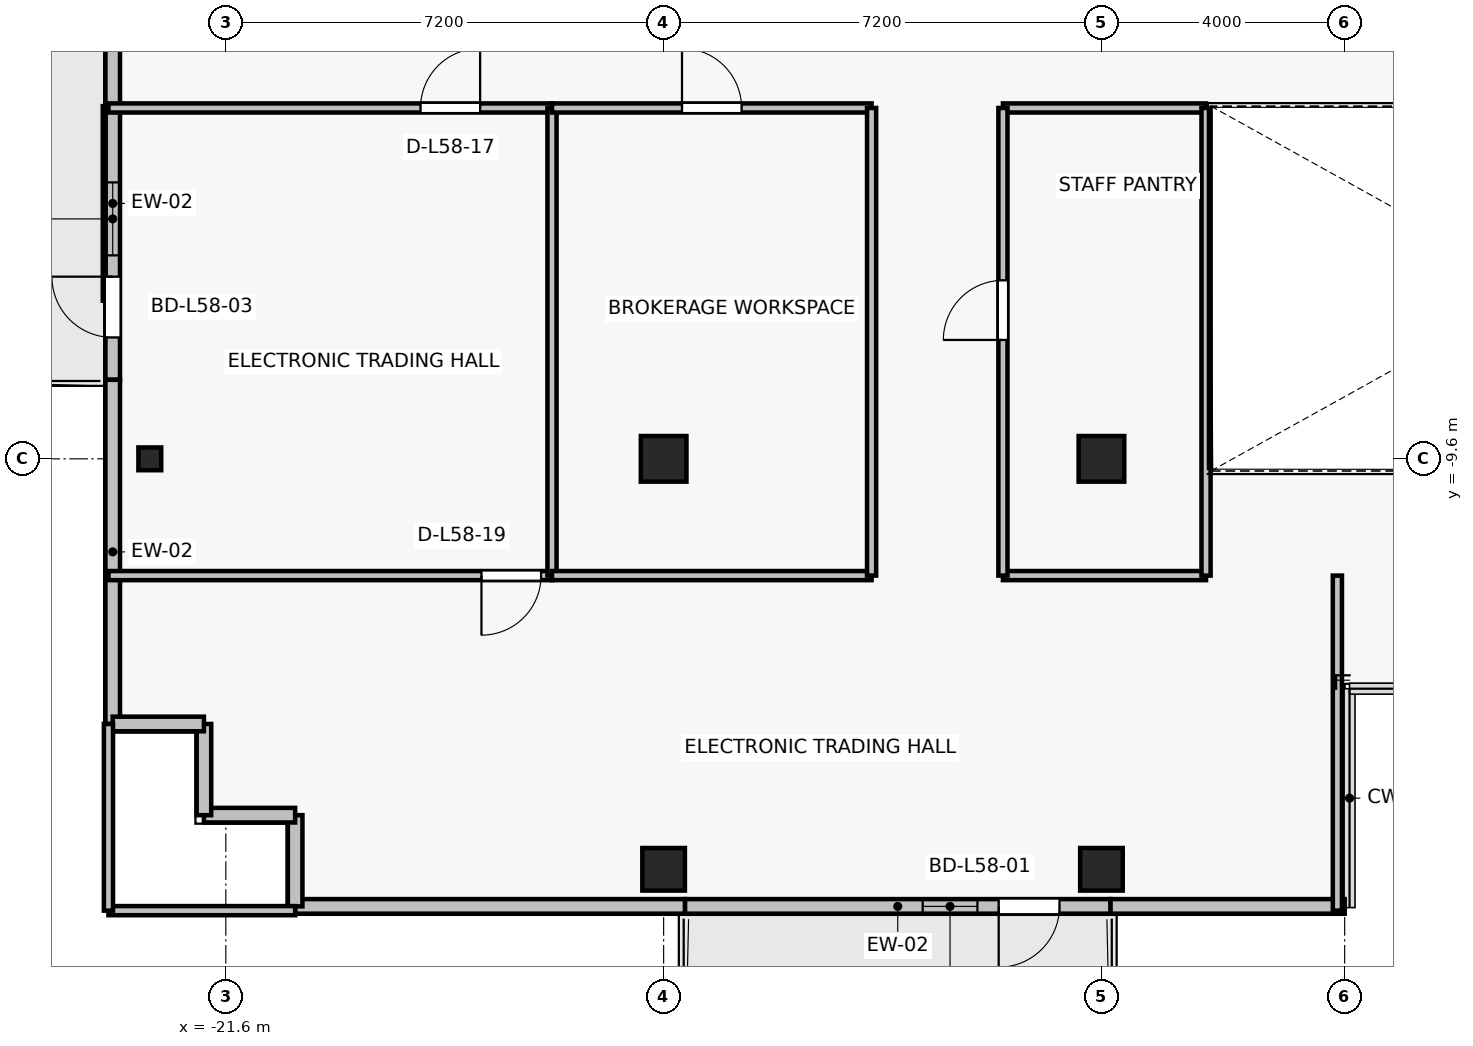
"""IFC4 building model, lengths in metres.
Left out: names, types, materials, properties, quantities, classifications, styles, units other than length and angle.
Written with IfcOpenShell. Run it as: python <this file> out.ifc"""

import sys

from ifc_helpers import new_model, si_unit, direction, frame, frame_2d, origin, origin_2d, place, context, subcontext, project, spatial, rectangle, i_section, extrude, source, transform, mapped, element, fill, save


model = new_model("IFC4")
c1 = context("Model", 3, precision=1e-05, world=origin(), true_north=direction((0.0, 1.0)))
c2 = subcontext(c1, "Body", "Model", "MODEL_VIEW")
j1 = project(units=[si_unit("LENGTHUNIT", "METRE"), si_unit("PLANEANGLEUNIT", "RADIAN")], contexts=[c1])
p1 = place(None, origin())
s1 = spatial("IfcSite", under=j1, at=p1, CompositionType="ELEMENT")
p2 = place(p1, origin())
s2 = spatial("IfcBuilding", under=s1, at=p2, CompositionType="ELEMENT")
p3 = place(p2, frame((0.0, 0.0, 208.9)))
s3 = spatial("IfcBuildingStorey", under=s2, at=p3, CompositionType="ELEMENT", Elevation=208.9)
for number, where, z_axis, x_axis in (
    (1, (-14.4, -9.6, 0.0), (0.0, 0.0, 1.0), (1.0, 0.0, 0.0)),
    (2, (-7.2, -9.6, 0.0), (0.0, 0.0, 1.0), (1.0, 0.0, 0.0)),
):
    element("IfcColumn", number, at=place(p3, frame(where, z_axis=z_axis, x_axis=x_axis)), inside=s3, PredefinedType="COLUMN", context=c2, shape_type="SweptSolid", body=[
        extrude(rectangle(XDim=0.75, YDim=0.75, at=origin_2d()), origin(), (0.0, 0.0, 1.0), 3.3),
    ])
for number, where, z_axis, x_axis in (
    (3, (-14.4, -16.35, 0.0), (0.0, 0.0, 1.0), (1.0, 0.0, 0.0)),
    (4, (-7.2, -16.35, 0.0), (0.0, 0.0, 1.0), (1.0, 0.0, 0.0)),
):
    element("IfcColumn", number, at=place(p3, frame(where, z_axis=z_axis, x_axis=x_axis)), inside=s3, PredefinedType="COLUMN", context=c2, shape_type="SweptSolid", body=[
        extrude(rectangle(XDim=0.7, YDim=0.7, at=origin_2d()), origin(), (0.0, 0.0, 1.0), 3.3),
    ])
p4 = place(p3, frame((-22.85, -9.6, 0.0), z_axis=(0.0, 0.0, 1.0), x_axis=(1.0, 0.0, 0.0)))
e5 = element("IfcColumn", 5, at=p4, inside=s3, PredefinedType="COLUMN", context=c2, shape_type="SweptSolid", body=[
    extrude(i_section(OverallWidth=0.375, OverallDepth=0.375, WebThickness=0.017, FlangeThickness=0.027, FilletRadius=0.015, at=origin_2d()), origin(), (0.0, 0.0, 1.0), 3.3),
])
p5 = place(p3, frame((-7.05, -16.96, 0.0), z_axis=(0.0, 0.0, 1.0), x_axis=(-1.0, 0.0, 0.0)))
e6 = element("IfcWall", 6, at=p5, inside=s3, PredefinedType="SOLIDWALL", context=c2, shape_type="SweptSolid", body=[
    extrude(rectangle(XDim=7.0, YDim=0.24, at=frame_2d((3.5, 0.0))), origin(), (0.0, 0.0, 1.0), 2.665),
])
p6 = place(p5, frame((0.84, 0.0, 0.0)))
e7 = element("IfcOpeningElement", 7, at=p6, cuts=e6, PredefinedType="OPENING", context=c2, shape_type="SweptSolid", body=[
    extrude(rectangle(XDim=1.0, YDim=2.2, at=frame_2d((0.5, 1.1))), frame((0.0, 0.13, 0.0), z_axis=(0.0, -1.0, 0.0), x_axis=(1.0, 0.0, 0.0)), (0.0, 0.0, 1.0), 0.26),
])
p7 = place(p5, frame((2.19, 0.0, 0.85)))
e8 = element("IfcOpeningElement", 8, at=p7, cuts=e6, PredefinedType="OPENING", context=c2, shape_type="SweptSolid", body=[
    extrude(rectangle(XDim=0.9, YDim=1.35, at=frame_2d((0.45, 0.675))), frame((0.0, 0.13, 0.0), z_axis=(0.0, -1.0, 0.0), x_axis=(1.0, 0.0, 0.0)), (0.0, 0.0, 1.0), 0.26),
])
p8 = place(p3, frame((-23.46, -8.3, 0.0), z_axis=(0.0, 0.0, 1.0), x_axis=(0.0, 1.0, 0.0)))
e9 = element("IfcWall", 9, at=p8, inside=s3, PredefinedType="SOLIDWALL", context=c2, shape_type="SweptSolid", body=[
    extrude(rectangle(XDim=5.8, YDim=0.24, at=frame_2d((2.9, 0.0))), origin(), (0.0, 0.0, 1.0), 3.075),
])
p9 = place(p8, frame((0.696, 0.0, 0.0)))
e10 = element("IfcOpeningElement", 10, at=p9, cuts=e9, PredefinedType="OPENING", context=c2, shape_type="SweptSolid", body=[
    extrude(rectangle(XDim=1.0, YDim=2.2, at=frame_2d((0.5, 1.1))), frame((0.0, 0.13, 0.0), z_axis=(0.0, -1.0, 0.0), x_axis=(1.0, 0.0, 0.0)), (0.0, 0.0, 1.0), 0.26),
])
p10 = place(p8, frame((2.046, 0.0, 0.85)))
e11 = element("IfcOpeningElement", 11, at=p10, cuts=e9, PredefinedType="OPENING", context=c2, shape_type="SweptSolid", body=[
    extrude(rectangle(XDim=1.2, YDim=1.5, at=frame_2d((0.6, 0.75))), frame((0.0, 0.13, 0.0), z_axis=(0.0, -1.0, 0.0), x_axis=(1.0, 0.0, 0.0)), (0.0, 0.0, 1.0), 0.26),
])
p11 = place(p3, frame((-23.46, -8.3, 0.0), z_axis=(0.0, 0.0, 1.0), x_axis=(0.0, -1.0, 0.0)))
e12 = element("IfcWall", 12, at=p11, inside=s3, PredefinedType="SOLIDWALL", context=c2, shape_type="SweptSolid", body=[
    extrude(rectangle(XDim=5.66, YDim=0.24, at=frame_2d((2.83, 0.0))), origin(), (0.0, 0.0, 1.0), 3.075),
])
p12 = place(p3, frame((-7.05, -16.96, 0.0), z_axis=(0.0, 0.0, 1.0), x_axis=(1.0, 0.0, 0.0)))
e13 = element("IfcWall", 13, at=p12, inside=s3, PredefinedType="SOLIDWALL", context=c2, shape_type="SweptSolid", body=[
    extrude(rectangle(XDim=3.85, YDim=0.24, at=frame_2d((1.925, 0.0))), origin(), (0.0, 0.0, 1.0), 3.075),
])
p13 = place(p3, frame((-20.46, -16.96, 0.0), z_axis=(0.0, 0.0, 1.0), x_axis=(1.0, 0.0, 0.0)))
e14 = element("IfcWall", 14, at=p13, inside=s3, PredefinedType="SOLIDWALL", context=c2, shape_type="SweptSolid", body=[
    extrude(rectangle(XDim=6.41, YDim=0.24, at=frame_2d((3.205, 0.0))), origin(), (0.0, 0.0, 1.0), 3.075),
])
for number, where, z_axis, x_axis in (
    (15, (-20.46, -15.46, 0.0), (0.0, 0.0, 1.0), (0.0, -1.0, 0.0)),
    (16, (-21.96, -15.46, 0.0), (0.0, 0.0, 1.0), (1.0, 0.0, 0.0)),
    (17, (-21.96, -13.96, 0.0), (0.0, 0.0, 1.0), (0.0, -1.0, 0.0)),
    (18, (-23.46, -13.96, 0.0), (0.0, 0.0, 1.0), (1.0, 0.0, 0.0)),
):
    element("IfcWall", number, at=place(p3, frame(where, z_axis=z_axis, x_axis=x_axis)), inside=s3, PredefinedType="SOLIDWALL", context=c2, shape_type="SweptSolid", body=[
        extrude(rectangle(XDim=1.5, YDim=0.24, at=frame_2d((0.75, 0.0))), origin(), (0.0, 0.0, 1.0), 3.075),
    ])
p14 = place(p3, frame((-16.236, -11.52, 0.0), z_axis=(0.0, 0.0, 1.0), x_axis=(-1.0, 0.0, 0.0)))
e19 = element("IfcWall", 19, at=p14, inside=s3, PredefinedType="PARTITIONING", context=c2, shape_type="SweptSolid", body=[
    extrude(rectangle(XDim=7.294, YDim=0.15, at=frame_2d((3.647, 0.0))), origin(), (0.0, 0.0, 1.0), 3.075),
])
p15 = place(p14, frame((0.18, 0.0, 0.0)))
e20 = element("IfcOpeningElement", 20, at=p15, cuts=e19, PredefinedType="OPENING", context=c2, shape_type="SweptSolid", body=[
    extrude(rectangle(XDim=0.98, YDim=2.15, at=frame_2d((0.49, 1.075))), frame((0.0, 0.085, 0.0), z_axis=(0.0, -1.0, 0.0), x_axis=(1.0, 0.0, 0.0)), (0.0, 0.0, 1.0), 0.17),
])
p16 = place(p3, frame((-23.53, -3.83, 0.0), z_axis=(0.0, 0.0, 1.0), x_axis=(1.0, 0.0, 0.0)))
e21 = element("IfcWall", 21, at=p16, inside=s3, PredefinedType="PARTITIONING", context=c2, shape_type="SweptSolid", body=[
    extrude(rectangle(XDim=7.294, YDim=0.15, at=frame_2d((3.647, 0.0))), origin(), (0.0, 0.0, 1.0), 2.765),
])
p17 = place(p16, frame((5.132, 0.0, 0.0)))
e22 = element("IfcOpeningElement", 22, at=p17, cuts=e21, PredefinedType="OPENING", context=c2, shape_type="SweptSolid", body=[
    extrude(rectangle(XDim=0.98, YDim=2.15, at=frame_2d((0.49, 1.075))), frame((0.0, 0.085, 0.0), z_axis=(0.0, -1.0, 0.0), x_axis=(1.0, 0.0, 0.0)), (0.0, 0.0, 1.0), 0.17),
])
p18 = place(p3, frame((-16.236, -3.83, 0.0), z_axis=(0.0, 0.0, 1.0), x_axis=(0.0, -1.0, 0.0)))
e23 = element("IfcWall", 23, at=p18, inside=s3, PredefinedType="PARTITIONING", context=c2, shape_type="SweptSolid", body=[
    extrude(rectangle(XDim=7.69, YDim=0.15, at=frame_2d((3.845, 0.0))), origin(), (0.0, 0.0, 1.0), 2.615),
])
p19 = place(p3, frame((-10.98, -11.52, 0.0), z_axis=(0.0, 0.0, 1.0), x_axis=(-1.0, 0.0, 0.0)))
e24 = element("IfcWall", 24, at=p19, inside=s3, PredefinedType="PARTITIONING", context=c2, shape_type="SweptSolid", body=[
    extrude(rectangle(XDim=5.256, YDim=0.15, at=frame_2d((2.628, 0.0))), origin(), (0.0, 0.0, 1.0), 2.615),
])
p20 = place(p3, frame((-16.236, -3.83, 0.0), z_axis=(0.0, 0.0, 1.0), x_axis=(1.0, 0.0, 0.0)))
e25 = element("IfcWall", 25, at=p20, inside=s3, PredefinedType="PARTITIONING", context=c2, shape_type="SweptSolid", body=[
    extrude(rectangle(XDim=5.256, YDim=0.15, at=frame_2d((2.628, 0.0))), origin(), (0.0, 0.0, 1.0), 2.615),
])
p21 = place(p20, frame((2.138, 0.0, 0.0)))
e26 = element("IfcOpeningElement", 26, at=p21, cuts=e25, PredefinedType="OPENING", context=c2, shape_type="SweptSolid", body=[
    extrude(rectangle(XDim=0.98, YDim=2.15, at=frame_2d((0.49, 1.075))), frame((0.0, 0.085, 0.0), z_axis=(0.0, -1.0, 0.0), x_axis=(1.0, 0.0, 0.0)), (0.0, 0.0, 1.0), 0.17),
])
p22 = place(p3, frame((-10.98, -3.83, 0.0), z_axis=(0.0, 0.0, 1.0), x_axis=(0.0, -1.0, 0.0)))
e27 = element("IfcWall", 27, at=p22, inside=s3, PredefinedType="PARTITIONING", context=c2, shape_type="SweptSolid", body=[
    extrude(rectangle(XDim=7.69, YDim=0.15, at=frame_2d((3.845, 0.0))), origin(), (0.0, 0.0, 1.0), 2.615),
])
p23 = place(p3, frame((-20.46, -17.03, 0.0), z_axis=(0.0, 0.0, 1.0), x_axis=(-1.0, 0.0, 0.0)))
e28 = element("IfcWall", 28, at=p23, inside=s3, PredefinedType="PARTITIONING", context=c2, shape_type="SweptSolid", body=[
    extrude(rectangle(XDim=3.07, YDim=0.15, at=frame_2d((1.535, 0.0))), origin(), (0.0, 0.0, 1.0), 2.665),
])
p24 = place(p3, frame((-23.53, -17.03, 0.0), z_axis=(0.0, 0.0, 1.0), x_axis=(0.0, 1.0, 0.0)))
e29 = element("IfcWall", 29, at=p24, inside=s3, PredefinedType="PARTITIONING", context=c2, shape_type="SweptSolid", body=[
    extrude(rectangle(XDim=3.07, YDim=0.15, at=frame_2d((1.535, 0.0))), origin(), (0.0, 0.0, 1.0), 3.075),
])
p25 = place(p3, frame((-3.32, -11.52, 0.0), z_axis=(0.0, 0.0, 1.0), x_axis=(0.0, -1.0, 0.0)))
e30 = element("IfcWall", 30, at=p25, inside=s3, PredefinedType="PARTITIONING", context=c2, shape_type="SweptSolid", body=[
    extrude(rectangle(XDim=5.51, YDim=0.15, at=frame_2d((2.755, 0.0))), origin(), (0.0, 0.0, 1.0), 2.615),
])
for number, where, z_axis, x_axis in (
    (31, (-5.48, -11.52, 0.0), (0.0, 0.0, 1.0), (-1.0, 0.0, 0.0)),
    (32, (-8.82, -3.83, 0.0), (0.0, 0.0, 1.0), (1.0, 0.0, 0.0)),
):
    element("IfcWall", number, at=place(p3, frame(where, z_axis=z_axis, x_axis=x_axis)), inside=s3, PredefinedType="PARTITIONING", context=c2, shape_type="SweptSolid", body=[
        extrude(rectangle(XDim=3.34, YDim=0.15, at=frame_2d((1.67, 0.0))), origin(), (0.0, 0.0, 1.0), 2.615),
    ])
p26 = place(p3, frame((-8.82, -11.52, 0.0), z_axis=(0.0, 0.0, 1.0), x_axis=(0.0, 1.0, 0.0)))
e33 = element("IfcWall", 33, at=p26, inside=s3, PredefinedType="PARTITIONING", context=c2, shape_type="SweptSolid", body=[
    extrude(rectangle(XDim=7.69, YDim=0.15, at=frame_2d((3.845, 0.0))), origin(), (0.0, 0.0, 1.0), 2.615),
])
p27 = place(p26, frame((3.875, 0.0, 0.0)))
e34 = element("IfcOpeningElement", 34, at=p27, cuts=e33, PredefinedType="OPENING", context=c2, shape_type="SweptSolid", body=[
    extrude(rectangle(XDim=0.98, YDim=2.15, at=frame_2d((0.49, 1.075))), frame((0.0, 0.085, 0.0), z_axis=(0.0, -1.0, 0.0), x_axis=(1.0, 0.0, 0.0)), (0.0, 0.0, 1.0), 0.17),
])
p28 = place(p3, frame((-5.48, -3.83, 0.0), z_axis=(0.0, 0.0, 1.0), x_axis=(0.0, -1.0, 0.0)))
e35 = element("IfcWall", 35, at=p28, inside=s3, PredefinedType="PARTITIONING", context=c2, shape_type="SweptSolid", body=[
    extrude(rectangle(XDim=7.69, YDim=0.15, at=frame_2d((3.845, 0.0))), origin(), (0.0, 0.0, 1.0), 2.615),
])
m1 = source(origin(), c2, "Body", "SweptSolid", [
    extrude(rectangle(XDim=1.0, YDim=2.2, at=frame_2d((0.5, 1.1))), frame((0.0, 0.025, 0.0), z_axis=(0.0, -1.0, 0.0), x_axis=(1.0, 0.0, 0.0)), (0.0, 0.0, 1.0), 0.05),
])
p29 = place(p6, origin())
e36 = element("IfcDoor", 36, at=p29, inside=s3, OperationType="SINGLE_SWING_RIGHT", PredefinedType="DOOR", context=c2, shape_type="MappedRepresentation", body=[
    mapped(m1, transform((0.0, 0.0, 0.0), x_axis=(1.0, 0.0, 0.0), y_axis=(0.0, 1.0, 0.0), z_axis=(0.0, 0.0, 1.0), scale=1.0)),
])
fill(e7, e36)
m2 = source(origin(), c2, "Body", "SweptSolid", [
    extrude(rectangle(XDim=0.9, YDim=1.35, at=frame_2d((0.45, 0.675))), frame((0.0, 0.03, 0.0), z_axis=(0.0, -1.0, 0.0), x_axis=(1.0, 0.0, 0.0)), (0.0, 0.0, 1.0), 0.06),
])
p30 = place(p7, origin())
e37 = element("IfcWindow", 37, at=p30, inside=s3, PartitioningType="SINGLE_PANEL", PredefinedType="WINDOW", context=c2, shape_type="MappedRepresentation", body=[
    mapped(m2, transform((0.0, 0.0, 0.0), x_axis=(1.0, 0.0, 0.0), y_axis=(0.0, 1.0, 0.0), z_axis=(0.0, 0.0, 1.0), scale=1.0)),
])
fill(e8, e37)
p31 = place(p9, origin())
e38 = element("IfcDoor", 38, at=p31, inside=s3, OperationType="SINGLE_SWING_RIGHT", PredefinedType="DOOR", context=c2, shape_type="MappedRepresentation", body=[
    mapped(m1, transform((0.0, 0.0, 0.0), x_axis=(1.0, 0.0, 0.0), y_axis=(0.0, 1.0, 0.0), z_axis=(0.0, 0.0, 1.0), scale=1.0)),
])
fill(e10, e38)
m3 = source(origin(), c2, "Body", "SweptSolid", [
    extrude(rectangle(XDim=1.2, YDim=1.5, at=frame_2d((0.6, 0.75))), frame((0.0, 0.03, 0.0), z_axis=(0.0, -1.0, 0.0), x_axis=(1.0, 0.0, 0.0)), (0.0, 0.0, 1.0), 0.06),
])
p32 = place(p10, origin())
e39 = element("IfcWindow", 39, at=p32, inside=s3, PartitioningType="SINGLE_PANEL", PredefinedType="WINDOW", context=c2, shape_type="MappedRepresentation", body=[
    mapped(m3, transform((0.0, 0.0, 0.0), x_axis=(1.0, 0.0, 0.0), y_axis=(0.0, 1.0, 0.0), z_axis=(0.0, 0.0, 1.0), scale=1.0)),
])
fill(e11, e39)
m4 = source(origin(), c2, "Body", "SweptSolid", [
    extrude(rectangle(XDim=0.98, YDim=2.15, at=frame_2d((0.49, 1.075))), frame((0.0, 0.025, 0.0), z_axis=(0.0, -1.0, 0.0), x_axis=(1.0, 0.0, 0.0)), (0.0, 0.0, 1.0), 0.05),
])
p33 = place(p17, origin())
e40 = element("IfcDoor", 40, at=p33, inside=s3, OperationType="SINGLE_SWING_RIGHT", PredefinedType="DOOR", context=c2, shape_type="MappedRepresentation", body=[
    mapped(m4, transform((0.0, 0.0, 0.0), x_axis=(1.0, 0.0, 0.0), y_axis=(0.0, 1.0, 0.0), z_axis=(0.0, 0.0, 1.0), scale=1.0)),
])
fill(e22, e40)
p34 = place(p21, origin())
e41 = element("IfcDoor", 41, at=p34, inside=s3, OperationType="SINGLE_SWING_LEFT", PredefinedType="DOOR", context=c2, shape_type="MappedRepresentation", body=[
    mapped(m4, transform((0.0, 0.0, 0.0), x_axis=(1.0, 0.0, 0.0), y_axis=(0.0, 1.0, 0.0), z_axis=(0.0, 0.0, 1.0), scale=1.0)),
])
fill(e26, e41)
p35 = place(p15, origin())
e42 = element("IfcDoor", 42, at=p35, inside=s3, OperationType="SINGLE_SWING_RIGHT", PredefinedType="DOOR", context=c2, shape_type="MappedRepresentation", body=[
    mapped(m4, transform((0.0, 0.0, 0.0), x_axis=(1.0, 0.0, 0.0), y_axis=(0.0, 1.0, 0.0), z_axis=(0.0, 0.0, 1.0), scale=1.0)),
])
fill(e20, e42)
p36 = place(p27, origin())
e43 = element("IfcDoor", 43, at=p36, inside=s3, OperationType="SINGLE_SWING_LEFT", PredefinedType="DOOR", context=c2, shape_type="MappedRepresentation", body=[
    mapped(m4, transform((0.0, 0.0, 0.0), x_axis=(1.0, 0.0, 0.0), y_axis=(0.0, 1.0, 0.0), z_axis=(0.0, 0.0, 1.0), scale=1.0)),
])
fill(e34, e43)
save(model, sys.argv[1])
